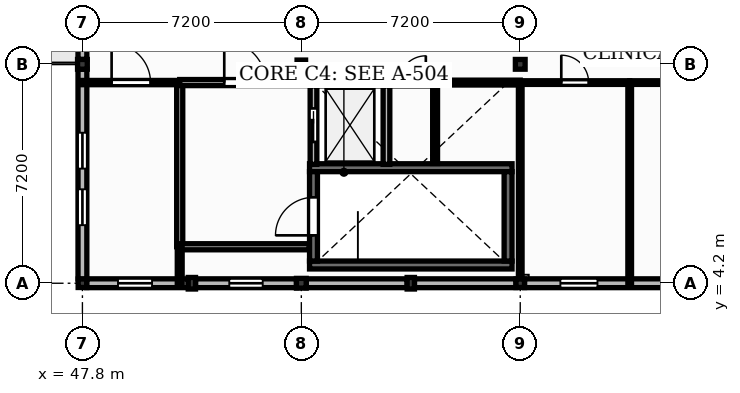
"""IFC4 building model, lengths in metres.
Left out: names, types, materials, properties, quantities, classifications, styles, units other than length and angle.
Written with IfcOpenShell. Run it as: python <this file> out.ifc"""

import sys

from ifc_helpers import new_model, si_unit, direction, frame, frame_2d, origin, origin_2d, place, context, subcontext, project, spatial, rectangle, extrude, element, fill, save


model = new_model("IFC4")
c1 = context("Model", 3, precision=1e-05, world=origin(), true_north=direction((0.0, 1.0)))
c2 = subcontext(c1, "Body", "Model", "MODEL_VIEW")
j1 = project(units=[si_unit("LENGTHUNIT", "METRE"), si_unit("PLANEANGLEUNIT", "RADIAN")], contexts=[c1])
p1 = place(None, origin())
s1 = spatial("IfcSite", under=j1, at=p1, CompositionType="ELEMENT")
p2 = place(p1, origin())
s2 = spatial("IfcBuilding", under=s1, at=p2, CompositionType="ELEMENT")
p3 = place(p2, frame((0.0, 0.0, 13.2)))
s3 = spatial("IfcBuildingStorey", under=s2, at=p3, CompositionType="ELEMENT", Elevation=13.2)
p4 = place(p3, frame((47.8, 4.2, 0.0), z_axis=(0.0, 0.0, 1.0), x_axis=(1.0, 0.0, 0.0)))
e1 = element("IfcColumn", 1, at=p4, inside=s3, PredefinedType="COLUMN", context=c2, shape_type="SweptSolid", body=[
    extrude(rectangle(XDim=0.28, YDim=0.28, at=origin_2d()), origin(), (0.0, 0.0, 1.0), 3.98),
])
p5 = place(p3, frame((47.8, 11.4, 0.0), z_axis=(0.0, 0.0, 1.0), x_axis=(1.0, 0.0, 0.0)))
e2 = element("IfcColumn", 2, at=p5, inside=s3, PredefinedType="COLUMN", context=c2, shape_type="SweptSolid", body=[
    extrude(rectangle(XDim=0.32, YDim=0.32, at=origin_2d()), origin(), (0.0, 0.0, 1.0), 6.045),
])
p6 = place(p3, frame((55.0, 4.2, 0.0), z_axis=(0.0, 0.0, 1.0), x_axis=(1.0, 0.0, 0.0)))
e3 = element("IfcColumn", 3, at=p6, inside=s3, PredefinedType="COLUMN", context=c2, shape_type="SweptSolid", body=[
    extrude(rectangle(XDim=0.32, YDim=0.32, at=origin_2d()), origin(), (0.0, 0.0, 1.0), 3.98),
])
p7 = place(p3, frame((55.0, 11.4, 0.0), z_axis=(0.0, 0.0, 1.0), x_axis=(1.0, 0.0, 0.0)))
e4 = element("IfcColumn", 4, at=p7, inside=s3, PredefinedType="COLUMN", context=c2, shape_type="SweptSolid", body=[
    extrude(rectangle(XDim=0.28, YDim=0.28, at=origin_2d()), origin(), (0.0, 0.0, 1.0), 6.045),
])
p8 = place(p3, frame((62.2, 4.2, 0.0), z_axis=(0.0, 0.0, 1.0), x_axis=(1.0, 0.0, 0.0)))
e5 = element("IfcColumn", 5, at=p8, inside=s3, PredefinedType="COLUMN", context=c2, shape_type="SweptSolid", body=[
    extrude(rectangle(XDim=0.28, YDim=0.28, at=origin_2d()), origin(), (0.0, 0.0, 1.0), 3.98),
])
p9 = place(p3, frame((62.2, 11.4, 0.0), z_axis=(0.0, 0.0, 1.0), x_axis=(1.0, 0.0, 0.0)))
e6 = element("IfcColumn", 6, at=p9, inside=s3, PredefinedType="COLUMN", context=c2, shape_type="SweptSolid", body=[
    extrude(rectangle(XDim=0.32, YDim=0.32, at=origin_2d()), origin(), (0.0, 0.0, 1.0), 6.045),
])
for number, where, z_axis, x_axis in (
    (7, (51.4, 4.2, 0.0), (0.0, 0.0, 1.0), (1.0, 0.0, 0.0)),
    (8, (58.6, 4.2, 0.0), (0.0, 0.0, 1.0), (1.0, 0.0, 0.0)),
):
    element("IfcColumn", number, at=place(p3, frame(where, z_axis=z_axis, x_axis=x_axis)), inside=s3, PredefinedType="PILASTER", context=c2, shape_type="SweptSolid", body=[
        extrude(rectangle(XDim=0.24, YDim=0.38, at=origin_2d()), origin(), (0.0, 0.0, 1.0), 4.0),
    ])
p10 = place(p3, frame((47.94, 4.2, 0.0), z_axis=(0.0, 0.0, 1.0), x_axis=(1.0, 0.0, 0.0)))
e9 = element("IfcWall", 9, at=p10, inside=s3, PredefinedType="SOLIDWALL", context=c2, shape_type="SweptSolid", body=[
    extrude(rectangle(XDim=3.34, YDim=0.29, at=frame_2d((1.67, 0.0))), origin(), (0.0, 0.0, 1.0), 4.0),
])
p11 = place(p10, frame((1.03, 0.0, 1.05)))
e10 = element("IfcOpeningElement", 10, at=p11, cuts=e9, PredefinedType="OPENING", context=c2, shape_type="SweptSolid", body=[
    extrude(rectangle(XDim=1.12, YDim=1.65, at=frame_2d((0.56, 0.825))), frame((0.0, 0.155, 0.0), z_axis=(0.0, -1.0, 0.0), x_axis=(1.0, 0.0, 0.0)), (0.0, 0.0, 1.0), 0.31),
])
p12 = place(p3, frame((51.52, 4.2, 0.0), z_axis=(0.0, 0.0, 1.0), x_axis=(1.0, 0.0, 0.0)))
e11 = element("IfcWall", 11, at=p12, inside=s3, PredefinedType="SOLIDWALL", context=c2, shape_type="SweptSolid", body=[
    extrude(rectangle(XDim=3.32, YDim=0.29, at=frame_2d((1.66, 0.0))), origin(), (0.0, 0.0, 1.0), 4.0),
])
p13 = place(p12, frame((1.11, 0.0, 1.0)))
e12 = element("IfcOpeningElement", 12, at=p13, cuts=e11, PredefinedType="OPENING", context=c2, shape_type="SweptSolid", body=[
    extrude(rectangle(XDim=1.1, YDim=2.2, at=frame_2d((0.55, 1.1))), frame((0.0, 0.155, 0.0), z_axis=(0.0, -1.0, 0.0), x_axis=(1.0, 0.0, 0.0)), (0.0, 0.0, 1.0), 0.31),
])
p14 = place(p3, frame((47.8, 4.34, 0.0), z_axis=(0.0, 0.0, 1.0), x_axis=(0.0, 1.0, 0.0)))
e13 = element("IfcWall", 13, at=p14, inside=s3, PredefinedType="SOLIDWALL", context=c2, shape_type="SweptSolid", body=[
    extrude(rectangle(XDim=6.9, YDim=0.29, at=frame_2d((3.45, 0.0))), origin(), (0.0, 0.0, 1.0), 4.0),
])
p15 = place(p14, frame((1.77, 0.0, 0.9)))
e14 = element("IfcOpeningElement", 14, at=p15, cuts=e13, PredefinedType="OPENING", context=c2, shape_type="SweptSolid", body=[
    extrude(rectangle(XDim=1.18, YDim=2.4, at=frame_2d((0.59, 1.2))), frame((0.0, 0.155, 0.0), z_axis=(0.0, -1.0, 0.0), x_axis=(1.0, 0.0, 0.0)), (0.0, 0.0, 1.0), 0.31),
])
p16 = place(p14, frame((3.63, 0.0, 0.9)))
e15 = element("IfcOpeningElement", 15, at=p16, cuts=e13, PredefinedType="OPENING", context=c2, shape_type="SweptSolid", body=[
    extrude(rectangle(XDim=1.18, YDim=2.4, at=frame_2d((0.59, 1.2))), frame((0.0, 0.155, 0.0), z_axis=(0.0, -1.0, 0.0), x_axis=(1.0, 0.0, 0.0)), (0.0, 0.0, 1.0), 0.31),
])
p17 = place(p3, frame((47.8, 11.56, 0.0), z_axis=(0.0, 0.0, 1.0), x_axis=(0.0, 1.0, 0.0)))
e16 = element("IfcWall", 16, at=p17, inside=s3, PredefinedType="SOLIDWALL", context=c2, shape_type="SweptSolid", body=[
    extrude(rectangle(XDim=6.9, YDim=0.29, at=frame_2d((3.45, 0.0))), origin(), (0.0, 0.0, 1.0), 4.0),
])
p18 = place(p17, frame((2.925, 0.0, 0.0)))
e17 = element("IfcOpeningElement", 17, at=p18, cuts=e16, PredefinedType="OPENING", context=c2, shape_type="SweptSolid", body=[
    extrude(rectangle(XDim=1.05, YDim=2.2, at=frame_2d((0.525, 1.1))), frame((0.0, 0.155, 0.0), z_axis=(0.0, -1.0, 0.0), x_axis=(1.0, 0.0, 0.0)), (0.0, 0.0, 1.0), 0.31),
])
p19 = place(p17, frame((4.782, 0.0, 1.35)))
e18 = element("IfcOpeningElement", 18, at=p19, cuts=e16, PredefinedType="OPENING", context=c2, shape_type="SweptSolid", body=[
    extrude(rectangle(XDim=1.25, YDim=1.4, at=frame_2d((0.625, 0.7))), frame((0.0, 0.155, 0.0), z_axis=(0.0, -1.0, 0.0), x_axis=(1.0, 0.0, 0.0)), (0.0, 0.0, 1.0), 0.31),
])
p20 = place(p3, frame((55.16, 4.2, 0.0), z_axis=(0.0, 0.0, 1.0), x_axis=(1.0, 0.0, 0.0)))
e19 = element("IfcWall", 19, at=p20, inside=s3, PredefinedType="SOLIDWALL", context=c2, shape_type="SweptSolid", body=[
    extrude(rectangle(XDim=3.32, YDim=0.29, at=frame_2d((1.66, 0.0))), origin(), (0.0, 0.0, 1.0), 4.0),
])
p21 = place(p3, frame((58.72, 4.2, 0.0), z_axis=(0.0, 0.0, 1.0), x_axis=(1.0, 0.0, 0.0)))
e20 = element("IfcWall", 20, at=p21, inside=s3, PredefinedType="SOLIDWALL", context=c2, shape_type="SweptSolid", body=[
    extrude(rectangle(XDim=3.34, YDim=0.29, at=frame_2d((1.67, 0.0))), origin(), (0.0, 0.0, 1.0), 4.0),
])
p22 = place(p3, frame((62.34, 4.2, 0.0), z_axis=(0.0, 0.0, 1.0), x_axis=(1.0, 0.0, 0.0)))
e21 = element("IfcWall", 21, at=p22, inside=s3, PredefinedType="SOLIDWALL", context=c2, shape_type="SweptSolid", body=[
    extrude(rectangle(XDim=8.5, YDim=0.29, at=frame_2d((4.25, 0.0))), origin(), (0.0, 0.0, 1.0), 4.0),
])
p23 = place(p22, frame((1.18, 0.0, 1.0)))
e22 = element("IfcOpeningElement", 22, at=p23, cuts=e21, PredefinedType="OPENING", context=c2, shape_type="SweptSolid", body=[
    extrude(rectangle(XDim=1.22, YDim=2.2, at=frame_2d((0.61, 1.1))), frame((0.0, 0.155, 0.0), z_axis=(0.0, -1.0, 0.0), x_axis=(1.0, 0.0, 0.0)), (0.0, 0.0, 1.0), 0.31),
])
p24 = place(p22, frame((5.245, 0.0, 1.0)))
e23 = element("IfcOpeningElement", 23, at=p24, cuts=e21, PredefinedType="OPENING", context=c2, shape_type="SweptSolid", body=[
    extrude(rectangle(XDim=1.35, YDim=2.2, at=frame_2d((0.675, 1.1))), frame((0.0, 0.155, 0.0), z_axis=(0.0, -1.0, 0.0), x_axis=(1.0, 0.0, 0.0)), (0.0, 0.0, 1.0), 0.31),
])
for number, where, z_axis, x_axis in (
    (24, (55.27, 4.8, 0.0), (0.0, 0.0, 1.0), (1.0, 0.0, 0.0)),
    (25, (55.27, 8.0, 0.0), (0.0, 0.0, 1.0), (1.0, 0.0, 0.0)),
):
    element("IfcWall", number, at=place(p3, frame(where, z_axis=z_axis, x_axis=x_axis)), inside=s3, PredefinedType="SHEAR", context=c2, shape_type="SweptSolid", body=[
        extrude(rectangle(XDim=6.66, YDim=0.26, at=frame_2d((3.33, 0.0))), origin(), (0.0, 0.0, 1.0), 3.95),
    ])
p25 = place(p3, frame((55.4, 4.93, 0.0), z_axis=(0.0, 0.0, 1.0), x_axis=(0.0, 1.0, 0.0)))
e26 = element("IfcWall", 26, at=p25, inside=s3, PredefinedType="SHEAR", context=c2, shape_type="SweptSolid", body=[
    extrude(rectangle(XDim=2.94, YDim=0.26, at=frame_2d((1.47, 0.0))), origin(), (0.0, 0.0, 1.0), 3.95),
])
p26 = place(p25, frame((0.845, 0.0, 0.0)))
e27 = element("IfcOpeningElement", 27, at=p26, cuts=e26, PredefinedType="OPENING", context=c2, shape_type="SweptSolid", body=[
    extrude(rectangle(XDim=1.25, YDim=2.15, at=frame_2d((0.625, 1.075))), frame((0.0, 0.14, 0.0), z_axis=(0.0, -1.0, 0.0), x_axis=(1.0, 0.0, 0.0)), (0.0, 0.0, 1.0), 0.28),
])
p27 = place(p3, frame((61.8, 4.93, 0.0), z_axis=(0.0, 0.0, 1.0), x_axis=(0.0, 1.0, 0.0)))
e28 = element("IfcWall", 28, at=p27, inside=s3, PredefinedType="SHEAR", context=c2, shape_type="SweptSolid", body=[
    extrude(rectangle(XDim=2.94, YDim=0.26, at=frame_2d((1.47, 0.0))), origin(), (0.0, 0.0, 1.0), 3.95),
])
p28 = place(p3, frame((55.4, 10.8, 0.0), z_axis=(0.0, 0.0, 1.0), x_axis=(1.0, 0.0, 0.0)))
e29 = element("IfcWall", 29, at=p28, inside=s3, PredefinedType="SOLIDWALL", context=c2, shape_type="SweptSolid", body=[
    extrude(rectangle(XDim=2.4, YDim=0.22, at=frame_2d((1.2, 0.0))), origin(), (0.0, 0.0, 1.0), 3.95),
])
p29 = place(p3, frame((55.4, 8.11, 0.0), z_axis=(0.0, 0.0, 1.0), x_axis=(0.0, 1.0, 0.0)))
e30 = element("IfcWall", 30, at=p29, inside=s3, PredefinedType="SOLIDWALL", context=c2, shape_type="SweptSolid", body=[
    extrude(rectangle(XDim=2.58, YDim=0.22, at=frame_2d((1.29, 0.0))), origin(), (0.0, 0.0, 1.0), 3.95),
])
p30 = place(p29, frame((0.74, 0.0, 0.0)))
e31 = element("IfcOpeningElement", 31, at=p30, cuts=e30, PredefinedType="OPENING", context=c2, shape_type="SweptSolid", body=[
    extrude(rectangle(XDim=1.1, YDim=2.15, at=frame_2d((0.55, 1.075))), frame((0.0, 0.12, 0.0), z_axis=(0.0, -1.0, 0.0), x_axis=(1.0, 0.0, 0.0)), (0.0, 0.0, 1.0), 0.24),
])
p31 = place(p3, frame((57.8, 8.11, 0.0), z_axis=(0.0, 0.0, 1.0), x_axis=(0.0, 1.0, 0.0)))
e32 = element("IfcWall", 32, at=p31, inside=s3, PredefinedType="SOLIDWALL", context=c2, shape_type="SweptSolid", body=[
    extrude(rectangle(XDim=2.58, YDim=0.22, at=frame_2d((1.29, 0.0))), origin(), (0.0, 0.0, 1.0), 3.95),
])
p32 = place(p3, frame((47.8, 10.8, 0.0), z_axis=(0.0, 0.0, 1.0), x_axis=(1.0, 0.0, 0.0)))
e33 = element("IfcWall", 33, at=p32, inside=s3, PredefinedType="PARTITIONING", context=c2, shape_type="SweptSolid", body=[
    extrude(rectangle(XDim=3.2, YDim=0.14, at=frame_2d((1.6, 0.0))), origin(), (0.0, 0.0, 1.0), 3.75),
])
p33 = place(p32, frame((0.96, 0.0, 0.0)))
e34 = element("IfcOpeningElement", 34, at=p33, cuts=e33, PredefinedType="OPENING", context=c2, shape_type="SweptSolid", body=[
    extrude(rectangle(XDim=1.28, YDim=2.2, at=frame_2d((0.64, 1.1))), frame((0.0, 0.08, 0.0), z_axis=(0.0, -1.0, 0.0), x_axis=(1.0, 0.0, 0.0)), (0.0, 0.0, 1.0), 0.16),
])
p34 = place(p3, frame((51.0, 5.4, 0.0), z_axis=(0.0, 0.0, 1.0), x_axis=(0.0, 1.0, 0.0)))
e35 = element("IfcWall", 35, at=p34, inside=s3, PredefinedType="PARTITIONING", context=c2, shape_type="SweptSolid", body=[
    extrude(rectangle(XDim=5.33, YDim=0.2, at=frame_2d((2.665, 0.0))), origin(), (0.0, 0.0, 1.0), 3.75),
])
p35 = place(p3, frame((51.0, 10.8, 0.0), z_axis=(0.0, 0.0, 1.0), x_axis=(1.0, 0.0, 0.0)))
e36 = element("IfcWall", 36, at=p35, inside=s3, PredefinedType="PARTITIONING", context=c2, shape_type="SweptSolid", body=[
    extrude(rectangle(XDim=4.29, YDim=0.2, at=frame_2d((2.145, 0.0))), origin(), (0.0, 0.0, 1.0), 3.75),
])
p36 = place(p35, frame((1.465, 0.0, 0.0)))
e37 = element("IfcOpeningElement", 37, at=p36, cuts=e36, PredefinedType="OPENING", context=c2, shape_type="SweptSolid", body=[
    extrude(rectangle(XDim=1.36, YDim=2.2, at=frame_2d((0.68, 1.1))), frame((0.0, 0.11, 0.0), z_axis=(0.0, -1.0, 0.0), x_axis=(1.0, 0.0, 0.0)), (0.0, 0.0, 1.0), 0.22),
])
p37 = place(p3, frame((57.91, 10.8, 0.0), z_axis=(0.0, 0.0, 1.0), x_axis=(1.0, 0.0, 0.0)))
e38 = element("IfcWall", 38, at=p37, inside=s3, PredefinedType="SOLIDWALL", context=c2, shape_type="SweptSolid", body=[
    extrude(rectangle(XDim=1.49, YDim=0.22, at=frame_2d((0.745, 0.0))), origin(), (0.0, 0.0, 1.0), 3.75),
])
p38 = place(p37, frame((0.305, 0.0, 0.0)))
e39 = element("IfcOpeningElement", 39, at=p38, cuts=e38, PredefinedType="OPENING", context=c2, shape_type="SweptSolid", body=[
    extrude(rectangle(XDim=0.88, YDim=2.05, at=frame_2d((0.44, 1.025))), frame((0.0, 0.12, 0.0), z_axis=(0.0, -1.0, 0.0), x_axis=(1.0, 0.0, 0.0)), (0.0, 0.0, 1.0), 0.24),
])
p39 = place(p3, frame((62.2, 10.8, 0.0), z_axis=(0.0, 0.0, 1.0), x_axis=(1.0, 0.0, 0.0)))
e40 = element("IfcWall", 40, at=p39, inside=s3, PredefinedType="PLUMBINGWALL", context=c2, shape_type="SweptSolid", body=[
    extrude(rectangle(XDim=3.6, YDim=0.12, at=frame_2d((1.8, 0.0))), origin(), (0.0, 0.0, 1.0), 3.75),
])
p40 = place(p39, frame((1.35, 0.0, 0.0)))
e41 = element("IfcOpeningElement", 41, at=p40, cuts=e40, PredefinedType="OPENING", context=c2, shape_type="SweptSolid", body=[
    extrude(rectangle(XDim=0.9, YDim=2.1, at=frame_2d((0.45, 1.05))), frame((0.0, 0.07, 0.0), z_axis=(0.0, -1.0, 0.0), x_axis=(1.0, 0.0, 0.0)), (0.0, 0.0, 1.0), 0.14),
])
p41 = place(p3, frame((65.8, 4.2, 0.0), z_axis=(0.0, 0.0, 1.0), x_axis=(0.0, 1.0, 0.0)))
e42 = element("IfcWall", 42, at=p41, inside=s3, PredefinedType="PLUMBINGWALL", context=c2, shape_type="SweptSolid", body=[
    extrude(rectangle(XDim=6.53, YDim=0.12, at=frame_2d((3.265, 0.0))), origin(), (0.0, 0.0, 1.0), 3.75),
])
p42 = place(p3, frame((65.8, 10.8, 0.0), z_axis=(0.0, 0.0, 1.0), x_axis=(1.0, 0.0, 0.0)))
e43 = element("IfcWall", 43, at=p42, inside=s3, PredefinedType="PLUMBINGWALL", context=c2, shape_type="SweptSolid", body=[
    extrude(rectangle(XDim=5.995, YDim=0.12, at=frame_2d((2.998, 0.0))), origin(), (0.0, 0.0, 1.0), 3.75),
])
p43 = place(p42, frame((2.548, 0.0, 0.0)))
e44 = element("IfcOpeningElement", 44, at=p43, cuts=e43, PredefinedType="OPENING", context=c2, shape_type="SweptSolid", body=[
    extrude(rectangle(XDim=0.9, YDim=2.1, at=frame_2d((0.45, 1.05))), frame((0.0, 0.07, 0.0), z_axis=(0.0, -1.0, 0.0), x_axis=(1.0, 0.0, 0.0)), (0.0, 0.0, 1.0), 0.14),
])
p44 = place(p3, frame((59.4, 8.14, 0.0), z_axis=(0.0, 0.0, 1.0), x_axis=(0.0, 1.0, 0.0)))
e45 = element("IfcWall", 45, at=p44, inside=s3, PredefinedType="PARTITIONING", context=c2, shape_type="SweptSolid", body=[
    extrude(rectangle(XDim=2.59, YDim=0.16, at=frame_2d((1.295, 0.0))), origin(), (0.0, 0.0, 1.0), 3.75),
])
p45 = place(p3, frame((51.0, 5.4, 0.0), z_axis=(0.0, 0.0, 1.0), x_axis=(1.0, 0.0, 0.0)))
e46 = element("IfcWall", 46, at=p45, inside=s3, PredefinedType="PARTITIONING", context=c2, shape_type="SweptSolid", body=[
    extrude(rectangle(XDim=4.26, YDim=0.2, at=frame_2d((2.13, 0.0))), origin(), (0.0, 0.0, 1.0), 3.75),
])
p46 = place(p3, frame((59.4, 10.8, 0.0), z_axis=(0.0, 0.0, 1.0), x_axis=(1.0, 0.0, 0.0)))
e47 = element("IfcWall", 47, at=p46, inside=s3, PredefinedType="PARTITIONING", context=c2, shape_type="SweptSolid", body=[
    extrude(rectangle(XDim=2.8, YDim=0.16, at=frame_2d((1.4, 0.0))), origin(), (0.0, 0.0, 1.0), 3.75),
])
p47 = place(p3, frame((62.2, 4.34, 0.0), z_axis=(0.0, 0.0, 1.0), x_axis=(0.0, 1.0, 0.0)))
e48 = element("IfcWall", 48, at=p47, inside=s3, PredefinedType="PLUMBINGWALL", context=c2, shape_type="SweptSolid", body=[
    extrude(rectangle(XDim=6.39, YDim=0.12, at=frame_2d((3.195, 0.0))), origin(), (0.0, 0.0, 1.0), 3.75),
])
p48 = place(p3, frame((51.0, 4.2, 0.0), z_axis=(0.0, 0.0, 1.0), x_axis=(0.0, 1.0, 0.0)))
e49 = element("IfcWall", 49, at=p48, inside=s3, PredefinedType="PARTITIONING", context=c2, shape_type="SweptSolid", body=[
    extrude(rectangle(XDim=1.2, YDim=0.16, at=frame_2d((0.6, 0.0))), origin(), (0.0, 0.0, 1.0), 3.75),
])
p49 = place(p11, origin())
e50 = element("IfcWindow", 50, at=p49, inside=s3, PartitioningType="SINGLE_PANEL", PredefinedType="WINDOW", context=c2, shape_type="SweptSolid", body=[
    extrude(rectangle(XDim=1.12, YDim=1.65, at=frame_2d((0.56, 0.825))), frame((0.0, 0.03, 0.0), z_axis=(0.0, -1.0, 0.0), x_axis=(1.0, 0.0, 0.0)), (0.0, 0.0, 1.0), 0.06),
])
fill(e10, e50)
p50 = place(p13, origin())
e51 = element("IfcWindow", 51, at=p50, inside=s3, PartitioningType="SINGLE_PANEL", PredefinedType="WINDOW", context=c2, shape_type="SweptSolid", body=[
    extrude(rectangle(XDim=1.1, YDim=2.2, at=frame_2d((0.55, 1.1))), frame((0.0, 0.03, 0.0), z_axis=(0.0, -1.0, 0.0), x_axis=(1.0, 0.0, 0.0)), (0.0, 0.0, 1.0), 0.06),
])
fill(e12, e51)
p51 = place(p15, origin())
e52 = element("IfcWindow", 52, at=p51, inside=s3, PartitioningType="SINGLE_PANEL", PredefinedType="WINDOW", context=c2, shape_type="SweptSolid", body=[
    extrude(rectangle(XDim=1.18, YDim=2.4, at=frame_2d((0.59, 1.2))), frame((0.0, 0.03, 0.0), z_axis=(0.0, -1.0, 0.0), x_axis=(1.0, 0.0, 0.0)), (0.0, 0.0, 1.0), 0.06),
])
fill(e14, e52)
p52 = place(p16, origin())
e53 = element("IfcWindow", 53, at=p52, inside=s3, PartitioningType="SINGLE_PANEL", PredefinedType="WINDOW", context=c2, shape_type="SweptSolid", body=[
    extrude(rectangle(XDim=1.18, YDim=2.4, at=frame_2d((0.59, 1.2))), frame((0.0, 0.03, 0.0), z_axis=(0.0, -1.0, 0.0), x_axis=(1.0, 0.0, 0.0)), (0.0, 0.0, 1.0), 0.06),
])
fill(e15, e53)
p53 = place(p23, origin())
e54 = element("IfcWindow", 54, at=p53, inside=s3, PartitioningType="SINGLE_PANEL", PredefinedType="WINDOW", context=c2, shape_type="SweptSolid", body=[
    extrude(rectangle(XDim=1.22, YDim=2.2, at=frame_2d((0.61, 1.1))), frame((0.0, 0.03, 0.0), z_axis=(0.0, -1.0, 0.0), x_axis=(1.0, 0.0, 0.0)), (0.0, 0.0, 1.0), 0.06),
])
fill(e22, e54)
p54 = place(p30, origin())
e55 = element("IfcDoor", 55, at=p54, inside=s3, OperationType="SLIDING_TO_LEFT", PredefinedType="DOOR", context=c2, shape_type="SweptSolid", body=[
    extrude(rectangle(XDim=1.1, YDim=2.15, at=frame_2d((0.55, 1.075))), frame((0.0, 0.025, 0.0), z_axis=(0.0, -1.0, 0.0), x_axis=(1.0, 0.0, 0.0)), (0.0, 0.0, 1.0), 0.05),
])
fill(e31, e55)
p55 = place(p26, origin())
e56 = element("IfcDoor", 56, at=p55, inside=s3, OperationType="SINGLE_SWING_LEFT", PredefinedType="DOOR", context=c2, shape_type="SweptSolid", body=[
    extrude(rectangle(XDim=1.25, YDim=2.15, at=frame_2d((0.625, 1.075))), frame((0.0, 0.025, 0.0), z_axis=(0.0, -1.0, 0.0), x_axis=(1.0, 0.0, 0.0)), (0.0, 0.0, 1.0), 0.05),
])
fill(e27, e56)
p56 = place(p36, origin())
e57 = element("IfcDoor", 57, at=p56, inside=s3, OperationType="SINGLE_SWING_LEFT", PredefinedType="DOOR", context=c2, shape_type="SweptSolid", body=[
    extrude(rectangle(XDim=1.36, YDim=2.2, at=frame_2d((0.68, 1.1))), frame((0.0, 0.025, 0.0), z_axis=(0.0, -1.0, 0.0), x_axis=(1.0, 0.0, 0.0)), (0.0, 0.0, 1.0), 0.05),
])
fill(e37, e57)
p57 = place(p38, origin())
e58 = element("IfcDoor", 58, at=p57, inside=s3, OperationType="SINGLE_SWING_RIGHT", PredefinedType="DOOR", context=c2, shape_type="SweptSolid", body=[
    extrude(rectangle(XDim=0.88, YDim=2.05, at=frame_2d((0.44, 1.025))), frame((0.0, 0.025, 0.0), z_axis=(0.0, -1.0, 0.0), x_axis=(1.0, 0.0, 0.0)), (0.0, 0.0, 1.0), 0.05),
])
fill(e39, e58)
p58 = place(p40, origin())
e59 = element("IfcDoor", 59, at=p58, inside=s3, OperationType="SINGLE_SWING_LEFT", PredefinedType="DOOR", context=c2, shape_type="SweptSolid", body=[
    extrude(rectangle(XDim=0.9, YDim=2.1, at=frame_2d((0.45, 1.05))), frame((0.0, 0.025, 0.0), z_axis=(0.0, -1.0, 0.0), x_axis=(1.0, 0.0, 0.0)), (0.0, 0.0, 1.0), 0.05),
])
fill(e41, e59)
p59 = place(p33, origin())
e60 = element("IfcDoor", 60, at=p59, inside=s3, OperationType="SINGLE_SWING_LEFT", PredefinedType="DOOR", context=c2, shape_type="SweptSolid", body=[
    extrude(rectangle(XDim=1.28, YDim=2.2, at=frame_2d((0.64, 1.1))), frame((0.0, 0.025, 0.0), z_axis=(0.0, -1.0, 0.0), x_axis=(1.0, 0.0, 0.0)), (0.0, 0.0, 1.0), 0.05),
])
fill(e34, e60)
save(model, sys.argv[1])
